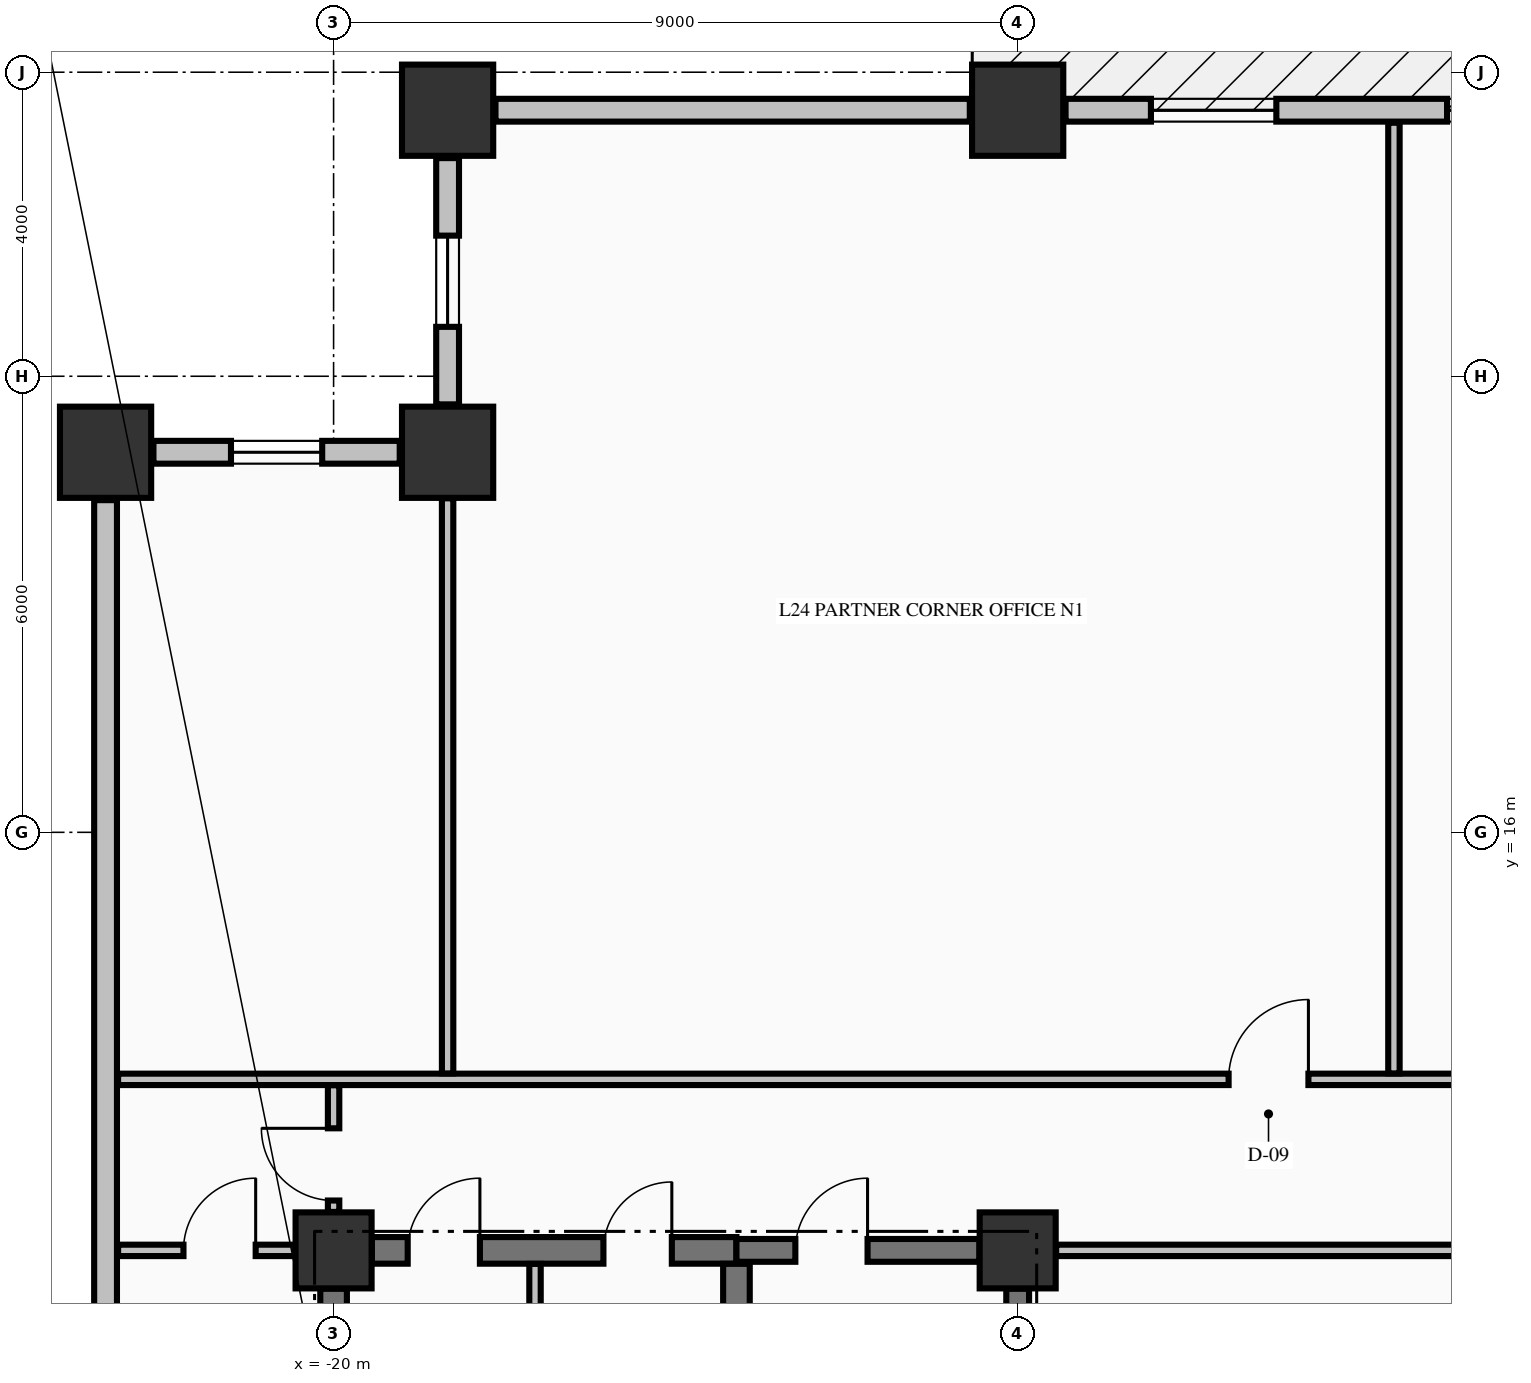
"""IFC4 building model, lengths in metres.
Left out: names, types, materials, properties, quantities, classifications, styles, units other than length and angle.
Written with IfcOpenShell. Run it as: python <this file> out.ifc"""

import sys

from ifc_helpers import new_model, si_unit, direction, frame, frame_2d, origin, origin_2d, place, context, subcontext, project, spatial, rectangle, extrude, element, fill, save


model = new_model("IFC4")
c1 = context("Model", 3, precision=1e-05, world=origin(), true_north=direction((0.0, 1.0)))
c2 = subcontext(c1, "Body", "Model", "MODEL_VIEW")
j1 = project(units=[si_unit("LENGTHUNIT", "METRE"), si_unit("PLANEANGLEUNIT", "RADIAN")], contexts=[c1])
p1 = place(None, origin())
s1 = spatial("IfcSite", under=j1, at=p1, CompositionType="ELEMENT")
p2 = place(p1, origin())
s2 = spatial("IfcBuilding", under=s1, at=p2, CompositionType="ELEMENT")
p3 = place(p2, frame((0.0, 0.0, 98.5)))
s3 = spatial("IfcBuildingStorey", under=s2, at=p3, CompositionType="ELEMENT", Elevation=98.5)
for number, where, z_axis, x_axis in (
    (1, (-18.5, 25.5, -0.275), (0.0, 0.0, 1.0), (1.0, 0.0, 0.0)),
    (2, (-11.0, 25.5, -0.275), (0.0, 0.0, 1.0), (1.0, 0.0, 0.0)),
    (3, (-23.0, 21.0, -0.275), (0.0, 0.0, 1.0), (1.0, 0.0, 0.0)),
    (4, (-18.5, 21.0, -0.275), (0.0, 0.0, 1.0), (1.0, 0.0, 0.0)),
):
    element("IfcColumn", number, at=place(p3, frame(where, z_axis=z_axis, x_axis=x_axis)), inside=s3, PredefinedType="COLUMN", context=c2, shape_type="SweptSolid", body=[
        extrude(rectangle(XDim=1.2, YDim=1.2, at=origin_2d()), origin(), (0.0, 0.0, 1.0), 3.595),
    ])
for number, where, z_axis, x_axis in (
    (5, (-20.0, 10.5, -0.275), (0.0, 0.0, 1.0), (1.0, 0.0, 0.0)),
    (6, (-11.0, 10.5, -0.275), (0.0, 0.0, 1.0), (1.0, 0.0, 0.0)),
):
    element("IfcColumn", number, at=place(p3, frame(where, z_axis=z_axis, x_axis=x_axis)), inside=s3, PredefinedType="COLUMN", context=c2, shape_type="SweptSolid", body=[
        extrude(rectangle(XDim=1.0, YDim=1.0, at=origin_2d()), origin(), (0.0, 0.0, 1.0), 3.595),
    ])
p4 = place(p3, frame((-18.5, 24.87, 0.0), z_axis=(0.0, 0.0, 1.0), x_axis=(0.0, -1.0, 0.0)))
e7 = element("IfcWall", 7, at=p4, inside=s3, PredefinedType="STANDARD", context=c2, shape_type="SweptSolid", body=[
    extrude(rectangle(XDim=3.24, YDim=0.3, at=frame_2d((1.62, 0.0))), origin(), (0.0, 0.0, 1.0), 2.712),
])
p5 = place(p4, frame((1.02, 0.0, 0.82)))
e8 = element("IfcOpeningElement", 8, at=p5, cuts=e7, PredefinedType="OPENING", context=c2, shape_type="SweptSolid", body=[
    extrude(rectangle(XDim=1.2, YDim=1.65, at=frame_2d((0.6, 0.825))), frame((0.0, 0.16, 0.0), z_axis=(0.0, -1.0, 0.0), x_axis=(1.0, 0.0, 0.0)), (0.0, 0.0, 1.0), 0.32),
])
p6 = place(p3, frame((-19.13, 21.0, 0.0), z_axis=(0.0, 0.0, 1.0), x_axis=(-1.0, 0.0, 0.0)))
e9 = element("IfcWall", 9, at=p6, inside=s3, PredefinedType="STANDARD", context=c2, shape_type="SweptSolid", body=[
    extrude(rectangle(XDim=3.24, YDim=0.3, at=frame_2d((1.62, 0.0))), origin(), (0.0, 0.0, 1.0), 2.712),
])
p7 = place(p6, frame((1.02, 0.0, 0.82)))
e10 = element("IfcOpeningElement", 10, at=p7, cuts=e9, PredefinedType="OPENING", context=c2, shape_type="SweptSolid", body=[
    extrude(rectangle(XDim=1.2, YDim=1.65, at=frame_2d((0.6, 0.825))), frame((0.0, 0.16, 0.0), z_axis=(0.0, -1.0, 0.0), x_axis=(1.0, 0.0, 0.0)), (0.0, 0.0, 1.0), 0.32),
])
p8 = place(p3, frame((-11.63, 25.5, 0.0), z_axis=(0.0, 0.0, 1.0), x_axis=(-1.0, 0.0, 0.0)))
e11 = element("IfcWall", 11, at=p8, inside=s3, PredefinedType="STANDARD", context=c2, shape_type="SweptSolid", body=[
    extrude(rectangle(XDim=6.24, YDim=0.3, at=frame_2d((3.12, 0.0))), origin(), (0.0, 0.0, 1.0), 2.712),
])
p9 = place(p3, frame((-0.63, 25.5, 0.0), z_axis=(0.0, 0.0, 1.0), x_axis=(-1.0, 0.0, 0.0)))
e12 = element("IfcWall", 12, at=p9, inside=s3, PredefinedType="STANDARD", context=c2, shape_type="SweptSolid", body=[
    extrude(rectangle(XDim=9.74, YDim=0.3, at=frame_2d((4.87, 0.0))), origin(), (0.0, 0.0, 1.0), 2.712),
])
p10 = place(p9, frame((0.2, 0.0, 0.0)))
e13 = element("IfcOpeningElement", 13, at=p10, cuts=e12, PredefinedType="OPENING", context=c2, shape_type="SweptSolid", body=[
    extrude(rectangle(XDim=1.1, YDim=2.15, at=frame_2d((0.55, 1.075))), frame((0.0, 0.16, 0.0), z_axis=(0.0, -1.0, 0.0), x_axis=(1.0, 0.0, 0.0)), (0.0, 0.0, 1.0), 0.32),
])
p11 = place(p9, frame((3.071, 0.0, 0.8)))
e14 = element("IfcOpeningElement", 14, at=p11, cuts=e12, PredefinedType="OPENING", context=c2, shape_type="SweptSolid", body=[
    extrude(rectangle(XDim=1.65, YDim=1.7, at=frame_2d((0.825, 0.85))), frame((0.0, 0.16, 0.0), z_axis=(0.0, -1.0, 0.0), x_axis=(1.0, 0.0, 0.0)), (0.0, 0.0, 1.0), 0.32),
])
p12 = place(p9, frame((6.967, 0.0, 0.8)))
e15 = element("IfcOpeningElement", 15, at=p12, cuts=e12, PredefinedType="OPENING", context=c2, shape_type="SweptSolid", body=[
    extrude(rectangle(XDim=1.65, YDim=1.7, at=frame_2d((0.825, 0.85))), frame((0.0, 0.16, 0.0), z_axis=(0.0, -1.0, 0.0), x_axis=(1.0, 0.0, 0.0)), (0.0, 0.0, 1.0), 0.32),
])
p13 = place(p3, frame((-23.0, 20.37, 0.0), z_axis=(0.0, 0.0, 1.0), x_axis=(0.0, -1.0, 0.0)))
e16 = element("IfcWall", 16, at=p13, inside=s3, PredefinedType="STANDARD", context=c2, shape_type="SweptSolid", body=[
    extrude(rectangle(XDim=10.74, YDim=0.3, at=frame_2d((5.37, 0.0))), origin(), (0.0, 0.0, 1.0), 2.712),
])
p14 = place(p3, frame((-19.496, 10.5, 0.0), z_axis=(0.0, 0.0, 1.0), x_axis=(1.0, 0.0, 0.0)))
e17 = element("IfcWall", 17, at=p14, inside=s3, PredefinedType="SHEAR", context=c2, shape_type="SweptSolid", body=[
    extrude(rectangle(XDim=4.796, YDim=0.35, at=frame_2d((2.398, 0.0))), origin(), (0.0, 0.0, 1.0), 3.32),
])
p15 = place(p14, frame((0.471, 0.0, 0.0)))
e18 = element("IfcOpeningElement", 18, at=p15, cuts=e17, PredefinedType="OPENING", context=c2, shape_type="SweptSolid", body=[
    extrude(rectangle(XDim=0.95, YDim=2.15, at=frame_2d((0.475, 1.075))), frame((0.0, 0.185, 0.0), z_axis=(0.0, -1.0, 0.0), x_axis=(1.0, 0.0, 0.0)), (0.0, 0.0, 1.0), 0.37),
])
p16 = place(p14, frame((3.046, 0.0, 0.0)))
e19 = element("IfcOpeningElement", 19, at=p16, cuts=e17, PredefinedType="OPENING", context=c2, shape_type="SweptSolid", body=[
    extrude(rectangle(XDim=0.9, YDim=2.15, at=frame_2d((0.45, 1.075))), frame((0.0, 0.185, 0.0), z_axis=(0.0, -1.0, 0.0), x_axis=(1.0, 0.0, 0.0)), (0.0, 0.0, 1.0), 0.37),
])
p17 = place(p3, frame((-14.7, 10.5, 0.0), z_axis=(0.0, 0.0, 1.0), x_axis=(1.0, 0.0, 0.0)))
e20 = element("IfcWall", 20, at=p17, inside=s3, PredefinedType="SHEAR", context=c2, shape_type="SweptSolid", body=[
    extrude(rectangle(XDim=3.196, YDim=0.3, at=frame_2d((1.598, 0.0))), origin(), (0.0, 0.0, 1.0), 3.32),
])
p18 = place(p17, frame((0.775, 0.0, 0.0)))
e21 = element("IfcOpeningElement", 21, at=p18, cuts=e20, PredefinedType="OPENING", context=c2, shape_type="SweptSolid", body=[
    extrude(rectangle(XDim=0.95, YDim=2.15, at=frame_2d((0.475, 1.075))), frame((0.0, 0.16, 0.0), z_axis=(0.0, -1.0, 0.0), x_axis=(1.0, 0.0, 0.0)), (0.0, 0.0, 1.0), 0.32),
])
p19 = place(p3, frame((-22.835, 10.5, 0.0), z_axis=(0.0, 0.0, 1.0), x_axis=(1.0, 0.0, 0.0)))
e22 = element("IfcWall", 22, at=p19, inside=s3, PredefinedType="PARTITIONING", context=c2, shape_type="SweptSolid", body=[
    extrude(rectangle(XDim=2.329, YDim=0.15, at=frame_2d((1.165, 0.0))), origin(), (0.0, 0.0, 1.0), 3.32),
])
p20 = place(p19, frame((0.86, 0.0, 0.0)))
e23 = element("IfcOpeningElement", 23, at=p20, cuts=e22, PredefinedType="OPENING", context=c2, shape_type="SweptSolid", body=[
    extrude(rectangle(XDim=0.95, YDim=2.15, at=frame_2d((0.475, 1.075))), frame((0.0, 0.085, 0.0), z_axis=(0.0, -1.0, 0.0), x_axis=(1.0, 0.0, 0.0)), (0.0, 0.0, 1.0), 0.17),
])
p21 = place(p3, frame((-10.494, 10.5, 0.0), z_axis=(0.0, 0.0, 1.0), x_axis=(1.0, 0.0, 0.0)))
e24 = element("IfcWall", 24, at=p21, inside=s3, PredefinedType="PARTITIONING", context=c2, shape_type="SweptSolid", body=[
    extrude(rectangle(XDim=20.988, YDim=0.15, at=frame_2d((10.494, 0.0))), origin(), (0.0, 0.0, 1.0), 3.32),
])
p22 = place(p21, frame((8.194, 0.0, 0.0)))
e25 = element("IfcOpeningElement", 25, at=p22, cuts=e24, PredefinedType="OPENING", context=c2, shape_type="SweptSolid", body=[
    extrude(rectangle(XDim=1.1, YDim=2.15, at=frame_2d((0.55, 1.075))), frame((0.0, 0.085, 0.0), z_axis=(0.0, -1.0, 0.0), x_axis=(1.0, 0.0, 0.0)), (0.0, 0.0, 1.0), 0.17),
])
p23 = place(p3, frame((-22.835, 12.75, 0.0), z_axis=(0.0, 0.0, 1.0), x_axis=(1.0, 0.0, 0.0)))
e26 = element("IfcWall", 26, at=p23, inside=s3, PredefinedType="PARTITIONING", context=c2, shape_type="SweptSolid", body=[
    extrude(rectangle(XDim=50.67, YDim=0.15, at=frame_2d((25.335, 0.0))), origin(), (0.0, 0.0, 1.0), 3.32),
])
p24 = place(p23, frame((14.61, 0.0, 0.0)))
e27 = element("IfcOpeningElement", 27, at=p24, cuts=e26, PredefinedType="OPENING", context=c2, shape_type="SweptSolid", body=[
    extrude(rectangle(XDim=1.05, YDim=2.15, at=frame_2d((0.525, 1.075))), frame((0.0, 0.085, 0.0), z_axis=(0.0, -1.0, 0.0), x_axis=(1.0, 0.0, 0.0)), (0.0, 0.0, 1.0), 0.17),
])
p25 = place(p23, frame((17.91, 0.0, 0.0)))
e28 = element("IfcOpeningElement", 28, at=p25, cuts=e26, PredefinedType="OPENING", context=c2, shape_type="SweptSolid", body=[
    extrude(rectangle(XDim=1.05, YDim=2.15, at=frame_2d((0.525, 1.075))), frame((0.0, 0.085, 0.0), z_axis=(0.0, -1.0, 0.0), x_axis=(1.0, 0.0, 0.0)), (0.0, 0.0, 1.0), 0.17),
])
p26 = place(p23, frame((35.79, 0.0, 0.0)))
e29 = element("IfcOpeningElement", 29, at=p26, cuts=e26, PredefinedType="OPENING", context=c2, shape_type="SweptSolid", body=[
    extrude(rectangle(XDim=1.05, YDim=2.15, at=frame_2d((0.525, 1.075))), frame((0.0, 0.085, 0.0), z_axis=(0.0, -1.0, 0.0), x_axis=(1.0, 0.0, 0.0)), (0.0, 0.0, 1.0), 0.17),
])
p27 = place(p3, frame((-20.0, 0.504, 0.0), z_axis=(0.0, 0.0, 1.0), x_axis=(0.0, 1.0, 0.0)))
e30 = element("IfcWall", 30, at=p27, inside=s3, PredefinedType="SHEAR", context=c2, shape_type="SweptSolid", body=[
    extrude(rectangle(XDim=9.492, YDim=0.35, at=frame_2d((4.746, 0.0))), origin(), (0.0, 0.0, 1.0), 3.32),
])
p28 = place(p3, frame((-14.7, 5.852, 0.0), z_axis=(0.0, 0.0, 1.0), x_axis=(0.0, 1.0, 0.0)))
e31 = element("IfcWall", 31, at=p28, inside=s3, PredefinedType="SHEAR", context=c2, shape_type="SweptSolid", body=[
    extrude(rectangle(XDim=4.471, YDim=0.35, at=frame_2d((2.235, 0.0))), origin(), (0.0, 0.0, 1.0), 3.32),
])
p29 = place(p3, frame((-11.0, 5.852, 0.0), z_axis=(0.0, 0.0, 1.0), x_axis=(0.0, 1.0, 0.0)))
e32 = element("IfcWall", 32, at=p29, inside=s3, PredefinedType="SHEAR", context=c2, shape_type="SweptSolid", body=[
    extrude(rectangle(XDim=4.144, YDim=0.3, at=frame_2d((2.072, 0.0))), origin(), (0.0, 0.0, 1.0), 3.32),
])
p30 = place(p3, frame((-20.0, 11.006, 0.0), z_axis=(0.0, 0.0, 1.0), x_axis=(0.0, 1.0, 0.0)))
e33 = element("IfcWall", 33, at=p30, inside=s3, PredefinedType="PARTITIONING", context=c2, shape_type="SweptSolid", body=[
    extrude(rectangle(XDim=1.666, YDim=0.15, at=frame_2d((0.833, 0.0))), origin(), (0.0, 0.0, 1.0), 2.81),
])
p31 = place(p30, frame((0.15, 0.0, 0.0)))
e34 = element("IfcOpeningElement", 34, at=p31, cuts=e33, PredefinedType="OPENING", context=c2, shape_type="SweptSolid", body=[
    extrude(rectangle(XDim=0.95, YDim=2.15, at=frame_2d((0.475, 1.075))), frame((0.0, 0.085, 0.0), z_axis=(0.0, -1.0, 0.0), x_axis=(1.0, 0.0, 0.0)), (0.0, 0.0, 1.0), 0.17),
])
p32 = place(p3, frame((-18.5, 12.828, 0.0), z_axis=(0.0, 0.0, 1.0), x_axis=(0.0, 1.0, 0.0)))
e35 = element("IfcWall", 35, at=p32, inside=s3, PredefinedType="PARTITIONING", context=c2, shape_type="SweptSolid", body=[
    extrude(rectangle(XDim=7.566, YDim=0.15, at=frame_2d((3.783, 0.0))), origin(), (0.0, 0.0, 1.0), 3.32),
])
p33 = place(p3, frame((-17.35, 5.178, 0.0), z_axis=(0.0, 0.0, 1.0), x_axis=(0.0, 1.0, 0.0)))
e36 = element("IfcWall", 36, at=p33, inside=s3, PredefinedType="PARTITIONING", context=c2, shape_type="SweptSolid", body=[
    extrude(rectangle(XDim=5.144, YDim=0.15, at=frame_2d((2.572, 0.0))), origin(), (0.0, 0.0, 1.0), 3.32),
])
p34 = place(p3, frame((-6.05, 12.828, 0.0), z_axis=(0.0, 0.0, 1.0), x_axis=(0.0, 1.0, 0.0)))
e37 = element("IfcWall", 37, at=p34, inside=s3, PredefinedType="PARTITIONING", context=c2, shape_type="SweptSolid", body=[
    extrude(rectangle(XDim=12.507, YDim=0.15, at=frame_2d((6.253, 0.0))), origin(), (0.0, 0.0, 1.0), 3.32),
])
p35 = place(p5, origin())
e38 = element("IfcWindow", 38, at=p35, inside=s3, PartitioningType="SINGLE_PANEL", PredefinedType="WINDOW", context=c2, shape_type="SweptSolid", body=[
    extrude(rectangle(XDim=1.2, YDim=1.65, at=frame_2d((0.6, 0.825))), frame((0.0, 0.03, 0.0), z_axis=(0.0, -1.0, 0.0), x_axis=(1.0, 0.0, 0.0)), (0.0, 0.0, 1.0), 0.06),
])
fill(e8, e38)
p36 = place(p7, origin())
e39 = element("IfcWindow", 39, at=p36, inside=s3, PartitioningType="SINGLE_PANEL", PredefinedType="WINDOW", context=c2, shape_type="SweptSolid", body=[
    extrude(rectangle(XDim=1.2, YDim=1.65, at=frame_2d((0.6, 0.825))), frame((0.0, 0.03, 0.0), z_axis=(0.0, -1.0, 0.0), x_axis=(1.0, 0.0, 0.0)), (0.0, 0.0, 1.0), 0.06),
])
fill(e10, e39)
p37 = place(p11, origin())
e40 = element("IfcWindow", 40, at=p37, inside=s3, PartitioningType="SINGLE_PANEL", PredefinedType="WINDOW", context=c2, shape_type="SweptSolid", body=[
    extrude(rectangle(XDim=1.65, YDim=1.7, at=frame_2d((0.825, 0.85))), frame((0.0, 0.03, 0.0), z_axis=(0.0, -1.0, 0.0), x_axis=(1.0, 0.0, 0.0)), (0.0, 0.0, 1.0), 0.06),
])
fill(e14, e40)
p38 = place(p12, origin())
e41 = element("IfcWindow", 41, at=p38, inside=s3, PartitioningType="SINGLE_PANEL", PredefinedType="WINDOW", context=c2, shape_type="SweptSolid", body=[
    extrude(rectangle(XDim=1.65, YDim=1.7, at=frame_2d((0.825, 0.85))), frame((0.0, 0.03, 0.0), z_axis=(0.0, -1.0, 0.0), x_axis=(1.0, 0.0, 0.0)), (0.0, 0.0, 1.0), 0.06),
])
fill(e15, e41)
p39 = place(p18, origin())
e42 = element("IfcDoor", 42, at=p39, inside=s3, OperationType="SINGLE_SWING_RIGHT", PredefinedType="DOOR", context=c2, shape_type="SweptSolid", body=[
    extrude(rectangle(XDim=0.95, YDim=2.15, at=frame_2d((0.475, 1.075))), frame((0.0, 0.025, 0.0), z_axis=(0.0, -1.0, 0.0), x_axis=(1.0, 0.0, 0.0)), (0.0, 0.0, 1.0), 0.05),
])
fill(e21, e42)
p40 = place(p15, origin())
e43 = element("IfcDoor", 43, at=p40, inside=s3, OperationType="SINGLE_SWING_RIGHT", PredefinedType="DOOR", context=c2, shape_type="SweptSolid", body=[
    extrude(rectangle(XDim=0.95, YDim=2.15, at=frame_2d((0.475, 1.075))), frame((0.0, 0.025, 0.0), z_axis=(0.0, -1.0, 0.0), x_axis=(1.0, 0.0, 0.0)), (0.0, 0.0, 1.0), 0.05),
])
fill(e18, e43)
p41 = place(p16, origin())
e44 = element("IfcDoor", 44, at=p41, inside=s3, OperationType="SINGLE_SWING_RIGHT", PredefinedType="DOOR", context=c2, shape_type="SweptSolid", body=[
    extrude(rectangle(XDim=0.9, YDim=2.15, at=frame_2d((0.45, 1.075))), frame((0.0, 0.025, 0.0), z_axis=(0.0, -1.0, 0.0), x_axis=(1.0, 0.0, 0.0)), (0.0, 0.0, 1.0), 0.05),
])
fill(e19, e44)
p42 = place(p24, origin())
e45 = element("IfcDoor", 45, at=p42, inside=s3, OperationType="SINGLE_SWING_RIGHT", PredefinedType="DOOR", context=c2, shape_type="SweptSolid", body=[
    extrude(rectangle(XDim=1.05, YDim=2.15, at=frame_2d((0.525, 1.075))), frame((0.0, 0.025, 0.0), z_axis=(0.0, -1.0, 0.0), x_axis=(1.0, 0.0, 0.0)), (0.0, 0.0, 1.0), 0.05),
])
fill(e27, e45)
p43 = place(p31, origin())
e46 = element("IfcDoor", 46, at=p43, inside=s3, OperationType="SINGLE_SWING_RIGHT", PredefinedType="DOOR", context=c2, shape_type="SweptSolid", body=[
    extrude(rectangle(XDim=0.95, YDim=2.15, at=frame_2d((0.475, 1.075))), frame((0.0, 0.025, 0.0), z_axis=(0.0, -1.0, 0.0), x_axis=(1.0, 0.0, 0.0)), (0.0, 0.0, 1.0), 0.05),
])
fill(e34, e46)
p44 = place(p20, origin())
e47 = element("IfcDoor", 47, at=p44, inside=s3, OperationType="SINGLE_SWING_RIGHT", PredefinedType="DOOR", context=c2, shape_type="SweptSolid", body=[
    extrude(rectangle(XDim=0.95, YDim=2.15, at=frame_2d((0.475, 1.075))), frame((0.0, 0.025, 0.0), z_axis=(0.0, -1.0, 0.0), x_axis=(1.0, 0.0, 0.0)), (0.0, 0.0, 1.0), 0.05),
])
fill(e23, e47)
save(model, sys.argv[1])
